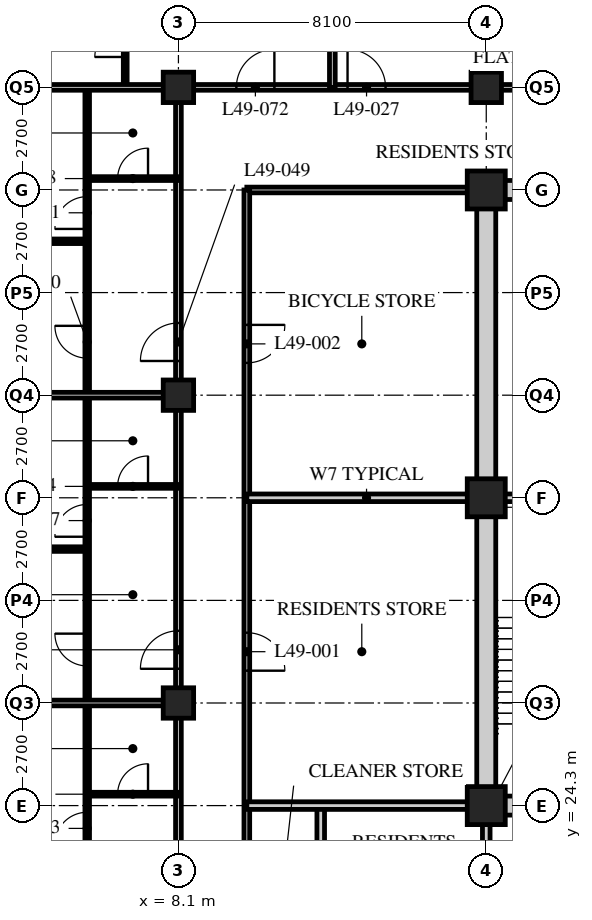
"""IFC4 building model, lengths in metres.
Left out: names, types, materials, properties, quantities, classifications, styles, units other than length and angle.
Written with IfcOpenShell. Run it as: python <this file> out.ifc"""

import sys

from ifc_helpers import new_model, si_unit, direction, frame, frame_2d, origin, origin_2d, place, context, subcontext, project, spatial, rectangle, hollow_rectangle, extrude, element, fill, save


model = new_model("IFC4")
c1 = context("Model", 3, precision=1e-05, world=origin(), true_north=direction((0.0, 1.0)))
c2 = subcontext(c1, "Body", "Model", "MODEL_VIEW")
j1 = project(units=[si_unit("LENGTHUNIT", "METRE"), si_unit("PLANEANGLEUNIT", "RADIAN")], contexts=[c1])
p1 = place(None, origin())
s1 = spatial("IfcSite", under=j1, at=p1, CompositionType="ELEMENT")
p2 = place(p1, origin())
s2 = spatial("IfcBuilding", under=s1, at=p2, CompositionType="ELEMENT")
p3 = place(p2, frame((0.0, 0.0, 192.0)))
s3 = spatial("IfcBuildingStorey", under=s2, at=p3, CompositionType="ELEMENT", Elevation=192.0)
for number, where, z_axis, x_axis in (
    (1, (8.1, 27.0, 0.0), (0.0, 0.0, 1.0), (1.0, 0.0, 0.0)),
    (2, (8.1, 35.1, 0.0), (0.0, 0.0, 1.0), (1.0, 0.0, 0.0)),
    (3, (8.1, 43.2, 0.0), (0.0, 0.0, 1.0), (1.0, 0.0, 0.0)),
):
    element("IfcColumn", number, at=place(p3, frame(where, z_axis=z_axis, x_axis=x_axis)), inside=s3, PredefinedType="COLUMN", context=c2, shape_type="SweptSolid", body=[
        extrude(hollow_rectangle(XDim=0.8, YDim=0.8, WallThickness=0.08, at=origin_2d()), origin(), (0.0, 0.0, 1.0), 3.6),
    ])
for number, where, z_axis, x_axis in (
    (4, (16.2, 24.3, 0.0), (0.0, 0.0, 1.0), (1.0, 0.0, 0.0)),
    (5, (16.2, 32.4, 0.0), (0.0, 0.0, 1.0), (1.0, 0.0, 0.0)),
    (6, (16.2, 40.5, 0.0), (0.0, 0.0, 1.0), (1.0, 0.0, 0.0)),
):
    element("IfcColumn", number, at=place(p3, frame(where, z_axis=z_axis, x_axis=x_axis)), inside=s3, PredefinedType="COLUMN", context=c2, shape_type="SweptSolid", body=[
        extrude(hollow_rectangle(XDim=1.0, YDim=1.0, WallThickness=0.1, at=origin_2d()), origin(), (0.0, 0.0, 1.0), 3.6),
    ])
p4 = place(p3, frame((16.2, 43.2, 0.0), z_axis=(0.0, 0.0, 1.0), x_axis=(1.0, 0.0, 0.0)))
e7 = element("IfcColumn", 7, at=p4, inside=s3, PredefinedType="COLUMN", context=c2, shape_type="SweptSolid", body=[
    extrude(hollow_rectangle(XDim=0.8, YDim=0.8, WallThickness=0.08, at=origin_2d()), origin(), (0.0, 0.0, 1.0), 3.6),
])
p5 = place(p3, frame((8.1, 43.2, 0.0), z_axis=(0.0, 0.0, 1.0), x_axis=(1.0, 0.0, 0.0)))
e8 = element("IfcWall", 8, at=p5, inside=s3, PredefinedType="PARTITIONING", context=c2, shape_type="SweptSolid", body=[
    extrude(rectangle(XDim=40.5, YDim=0.15, at=frame_2d((20.25, 0.0))), origin(), (0.0, 0.0, 1.0), 2.778),
])
p6 = place(p5, frame((4.45, 0.0, 0.0)))
e9 = element("IfcOpeningElement", 9, at=p6, cuts=e8, PredefinedType="OPENING", context=c2, shape_type="SweptSolid", body=[
    extrude(rectangle(XDim=1.0, YDim=2.1, at=frame_2d((0.5, 1.05))), frame((0.0, 0.085, 0.0), z_axis=(0.0, -1.0, 0.0), x_axis=(1.0, 0.0, 0.0)), (0.0, 0.0, 1.0), 0.17),
])
p7 = place(p5, frame((20.65, 0.0, 0.0)))
e10 = element("IfcOpeningElement", 10, at=p7, cuts=e8, PredefinedType="OPENING", context=c2, shape_type="SweptSolid", body=[
    extrude(rectangle(XDim=1.0, YDim=2.1, at=frame_2d((0.5, 1.05))), frame((0.0, 0.085, 0.0), z_axis=(0.0, -1.0, 0.0), x_axis=(1.0, 0.0, 0.0)), (0.0, 0.0, 1.0), 0.17),
])
p8 = place(p5, frame((28.75, 0.0, 0.0)))
e11 = element("IfcOpeningElement", 11, at=p8, cuts=e8, PredefinedType="OPENING", context=c2, shape_type="SweptSolid", body=[
    extrude(rectangle(XDim=1.0, YDim=2.1, at=frame_2d((0.5, 1.05))), frame((0.0, 0.085, 0.0), z_axis=(0.0, -1.0, 0.0), x_axis=(1.0, 0.0, 0.0)), (0.0, 0.0, 1.0), 0.17),
])
p9 = place(p5, frame((37.975, 0.0, 0.0)))
e12 = element("IfcOpeningElement", 12, at=p9, cuts=e8, PredefinedType="OPENING", context=c2, shape_type="SweptSolid", body=[
    extrude(rectangle(XDim=1.0, YDim=2.1, at=frame_2d((0.5, 1.05))), frame((0.0, 0.085, 0.0), z_axis=(0.0, -1.0, 0.0), x_axis=(1.0, 0.0, 0.0)), (0.0, 0.0, 1.0), 0.17),
])
p10 = place(p5, frame((1.525, 0.0, 0.0)))
e13 = element("IfcOpeningElement", 13, at=p10, cuts=e8, PredefinedType="OPENING", context=c2, shape_type="SweptSolid", body=[
    extrude(rectangle(XDim=1.0, YDim=2.1, at=frame_2d((0.5, 1.05))), frame((0.0, 0.085, 0.0), z_axis=(0.0, -1.0, 0.0), x_axis=(1.0, 0.0, 0.0)), (0.0, 0.0, 1.0), 0.17),
])
p11 = place(p3, frame((8.1, 18.9, 0.0), z_axis=(0.0, 0.0, 1.0), x_axis=(0.0, 1.0, 0.0)))
e14 = element("IfcWall", 14, at=p11, inside=s3, PredefinedType="PARTITIONING", context=c2, shape_type="SweptSolid", body=[
    extrude(rectangle(XDim=24.3, YDim=0.15, at=frame_2d((12.15, 0.0))), origin(), (0.0, 0.0, 1.0), 2.778),
])
p12 = place(p11, frame((0.9, 0.0, 0.0)))
e15 = element("IfcOpeningElement", 15, at=p12, cuts=e14, PredefinedType="OPENING", context=c2, shape_type="SweptSolid", body=[
    extrude(rectangle(XDim=1.0, YDim=2.1, at=frame_2d((0.5, 1.05))), frame((0.0, 0.085, 0.0), z_axis=(0.0, -1.0, 0.0), x_axis=(1.0, 0.0, 0.0)), (0.0, 0.0, 1.0), 0.17),
])
p13 = place(p11, frame((9.0, 0.0, 0.0)))
e16 = element("IfcOpeningElement", 16, at=p13, cuts=e14, PredefinedType="OPENING", context=c2, shape_type="SweptSolid", body=[
    extrude(rectangle(XDim=1.0, YDim=2.1, at=frame_2d((0.5, 1.05))), frame((0.0, 0.085, 0.0), z_axis=(0.0, -1.0, 0.0), x_axis=(1.0, 0.0, 0.0)), (0.0, 0.0, 1.0), 0.17),
])
p14 = place(p11, frame((17.1, 0.0, 0.0)))
e17 = element("IfcOpeningElement", 17, at=p14, cuts=e14, PredefinedType="OPENING", context=c2, shape_type="SweptSolid", body=[
    extrude(rectangle(XDim=1.0, YDim=2.1, at=frame_2d((0.5, 1.05))), frame((0.0, 0.085, 0.0), z_axis=(0.0, -1.0, 0.0), x_axis=(1.0, 0.0, 0.0)), (0.0, 0.0, 1.0), 0.17),
])
p15 = place(p3, frame((16.0, 40.5, 0.0), z_axis=(0.0, 0.0, 1.0), x_axis=(-1.0, 0.0, 0.0)))
e18 = element("IfcWall", 18, at=p15, inside=s3, PredefinedType="PARTITIONING", context=c2, shape_type="SweptSolid", body=[
    extrude(rectangle(XDim=6.1, YDim=0.15, at=frame_2d((3.05, 0.0))), origin(), (0.0, 0.0, 1.0), 3.39),
])
p16 = place(p3, frame((9.9, 40.5, 0.0), z_axis=(0.0, 0.0, 1.0), x_axis=(0.0, -1.0, 0.0)))
e19 = element("IfcWall", 19, at=p16, inside=s3, PredefinedType="PARTITIONING", context=c2, shape_type="SweptSolid", body=[
    extrude(rectangle(XDim=19.8, YDim=0.15, at=frame_2d((9.9, 0.0))), origin(), (0.0, 0.0, 1.0), 3.39),
])
p17 = place(p16, frame((11.65, 0.0, 0.0)))
e20 = element("IfcOpeningElement", 20, at=p17, cuts=e19, PredefinedType="OPENING", context=c2, shape_type="SweptSolid", body=[
    extrude(rectangle(XDim=1.0, YDim=2.1, at=frame_2d((0.5, 1.05))), frame((0.0, 0.085, 0.0), z_axis=(0.0, -1.0, 0.0), x_axis=(1.0, 0.0, 0.0)), (0.0, 0.0, 1.0), 0.17),
])
p18 = place(p16, frame((3.55, 0.0, 0.0)))
e21 = element("IfcOpeningElement", 21, at=p18, cuts=e19, PredefinedType="OPENING", context=c2, shape_type="SweptSolid", body=[
    extrude(rectangle(XDim=1.0, YDim=2.1, at=frame_2d((0.5, 1.05))), frame((0.0, 0.085, 0.0), z_axis=(0.0, -1.0, 0.0), x_axis=(1.0, 0.0, 0.0)), (0.0, 0.0, 1.0), 0.17),
])
p19 = place(p3, frame((9.9, 32.4, 0.0), z_axis=(0.0, 0.0, 1.0), x_axis=(1.0, 0.0, 0.0)))
e22 = element("IfcWall", 22, at=p19, inside=s3, PredefinedType="SOLIDWALL", context=c2, shape_type="SweptSolid", body=[
    extrude(rectangle(XDim=6.3, YDim=0.2, at=frame_2d((3.15, 0.0))), origin(), (0.0, 0.0, 1.0), 3.39),
])
p20 = place(p3, frame((16.2, 20.7, 0.0), z_axis=(0.0, 0.0, 1.0), x_axis=(0.0, 1.0, 0.0)))
e23 = element("IfcWall", 23, at=p20, inside=s3, PredefinedType="SOLIDWALL", context=c2, shape_type="SweptSolid", body=[
    extrude(rectangle(XDim=3.6, YDim=0.2, at=frame_2d((1.8, 0.0))), origin(), (0.0, 0.0, 1.0), 2.778),
])
p21 = place(p3, frame((11.844, 20.7, 0.0), z_axis=(0.0, 0.0, 1.0), x_axis=(0.0, 1.0, 0.0)))
e24 = element("IfcWall", 24, at=p21, inside=s3, PredefinedType="SOLIDWALL", context=c2, shape_type="SweptSolid", body=[
    extrude(rectangle(XDim=3.6, YDim=0.2, at=frame_2d((1.8, 0.0))), origin(), (0.0, 0.0, 1.0), 3.39),
])
p22 = place(p3, frame((9.9, 24.3, 0.0), z_axis=(0.0, 0.0, 1.0), x_axis=(1.0, 0.0, 0.0)))
e25 = element("IfcWall", 25, at=p22, inside=s3, PredefinedType="SOLIDWALL", context=c2, shape_type="SweptSolid", body=[
    extrude(rectangle(XDim=6.3, YDim=0.2, at=frame_2d((3.15, 0.0))), origin(), (0.0, 0.0, 1.0), 3.39),
])
p23 = place(p3, frame((5.7, 18.9, 0.0), z_axis=(0.0, 0.0, 1.0), x_axis=(0.0, 1.0, 0.0)))
e26 = element("IfcWall", 26, at=p23, inside=s3, PredefinedType="PARTITIONING", context=c2, shape_type="SweptSolid", body=[
    extrude(rectangle(XDim=24.3, YDim=0.12, at=frame_2d((12.15, 0.0))), origin(), (0.0, 0.0, 1.0), 3.39),
])
p24 = place(p23, frame((0.975, 0.0, 0.0)))
e27 = element("IfcOpeningElement", 27, at=p24, cuts=e26, PredefinedType="OPENING", context=c2, shape_type="SweptSolid", body=[
    extrude(rectangle(XDim=0.85, YDim=2.1, at=frame_2d((0.425, 1.05))), frame((0.0, 0.07, 0.0), z_axis=(0.0, -1.0, 0.0), x_axis=(1.0, 0.0, 0.0)), (0.0, 0.0, 1.0), 0.14),
])
p25 = place(p23, frame((4.375, 0.0, 0.0)))
e28 = element("IfcOpeningElement", 28, at=p25, cuts=e26, PredefinedType="OPENING", context=c2, shape_type="SweptSolid", body=[
    extrude(rectangle(XDim=0.85, YDim=2.1, at=frame_2d((0.425, 1.05))), frame((0.0, 0.07, 0.0), z_axis=(0.0, -1.0, 0.0), x_axis=(1.0, 0.0, 0.0)), (0.0, 0.0, 1.0), 0.14),
])
p26 = place(p23, frame((9.075, 0.0, 0.0)))
e29 = element("IfcOpeningElement", 29, at=p26, cuts=e26, PredefinedType="OPENING", context=c2, shape_type="SweptSolid", body=[
    extrude(rectangle(XDim=0.85, YDim=2.1, at=frame_2d((0.425, 1.05))), frame((0.0, 0.07, 0.0), z_axis=(0.0, -1.0, 0.0), x_axis=(1.0, 0.0, 0.0)), (0.0, 0.0, 1.0), 0.14),
])
p27 = place(p23, frame((12.475, 0.0, 0.0)))
e30 = element("IfcOpeningElement", 30, at=p27, cuts=e26, PredefinedType="OPENING", context=c2, shape_type="SweptSolid", body=[
    extrude(rectangle(XDim=0.85, YDim=2.1, at=frame_2d((0.425, 1.05))), frame((0.0, 0.07, 0.0), z_axis=(0.0, -1.0, 0.0), x_axis=(1.0, 0.0, 0.0)), (0.0, 0.0, 1.0), 0.14),
])
p28 = place(p23, frame((17.175, 0.0, 0.0)))
e31 = element("IfcOpeningElement", 31, at=p28, cuts=e26, PredefinedType="OPENING", context=c2, shape_type="SweptSolid", body=[
    extrude(rectangle(XDim=0.85, YDim=2.1, at=frame_2d((0.425, 1.05))), frame((0.0, 0.07, 0.0), z_axis=(0.0, -1.0, 0.0), x_axis=(1.0, 0.0, 0.0)), (0.0, 0.0, 1.0), 0.14),
])
p29 = place(p23, frame((20.575, 0.0, 0.0)))
e32 = element("IfcOpeningElement", 32, at=p29, cuts=e26, PredefinedType="OPENING", context=c2, shape_type="SweptSolid", body=[
    extrude(rectangle(XDim=0.85, YDim=2.1, at=frame_2d((0.425, 1.05))), frame((0.0, 0.07, 0.0), z_axis=(0.0, -1.0, 0.0), x_axis=(1.0, 0.0, 0.0)), (0.0, 0.0, 1.0), 0.14),
])
p30 = place(p3, frame((8.1, 24.6, 0.0), z_axis=(0.0, 0.0, 1.0), x_axis=(-1.0, 0.0, 0.0)))
e33 = element("IfcWall", 33, at=p30, inside=s3, PredefinedType="PARTITIONING", context=c2, shape_type="SweptSolid", body=[
    extrude(rectangle(XDim=2.4, YDim=0.1, at=frame_2d((1.2, 0.0))), origin(), (0.0, 0.0, 1.0), 3.39),
])
p31 = place(p30, frame((0.8, 0.0, 0.0)))
e34 = element("IfcOpeningElement", 34, at=p31, cuts=e33, PredefinedType="OPENING", context=c2, shape_type="SweptSolid", body=[
    extrude(rectangle(XDim=0.8, YDim=2.1, at=frame_2d((0.4, 1.05))), frame((0.0, 0.06, 0.0), z_axis=(0.0, -1.0, 0.0), x_axis=(1.0, 0.0, 0.0)), (0.0, 0.0, 1.0), 0.12),
])
p32 = place(p3, frame((8.1, 27.0, 0.0), z_axis=(0.0, 0.0, 1.0), x_axis=(-1.0, 0.0, 0.0)))
e35 = element("IfcWall", 35, at=p32, inside=s3, PredefinedType="PARTITIONING", context=c2, shape_type="SweptSolid", body=[
    extrude(rectangle(XDim=7.8, YDim=0.15, at=frame_2d((3.9, 0.0))), origin(), (0.0, 0.0, 1.0), 2.778),
])
p33 = place(p3, frame((8.1, 32.7, 0.0), z_axis=(0.0, 0.0, 1.0), x_axis=(-1.0, 0.0, 0.0)))
e36 = element("IfcWall", 36, at=p33, inside=s3, PredefinedType="PARTITIONING", context=c2, shape_type="SweptSolid", body=[
    extrude(rectangle(XDim=2.4, YDim=0.1, at=frame_2d((1.2, 0.0))), origin(), (0.0, 0.0, 1.0), 3.39),
])
p34 = place(p33, frame((0.8, 0.0, 0.0)))
e37 = element("IfcOpeningElement", 37, at=p34, cuts=e36, PredefinedType="OPENING", context=c2, shape_type="SweptSolid", body=[
    extrude(rectangle(XDim=0.8, YDim=2.1, at=frame_2d((0.4, 1.05))), frame((0.0, 0.06, 0.0), z_axis=(0.0, -1.0, 0.0), x_axis=(1.0, 0.0, 0.0)), (0.0, 0.0, 1.0), 0.12),
])
p35 = place(p3, frame((5.7, 31.05, 0.0), z_axis=(0.0, 0.0, 1.0), x_axis=(-1.0, 0.0, 0.0)))
e38 = element("IfcWall", 38, at=p35, inside=s3, PredefinedType="PARTITIONING", context=c2, shape_type="SweptSolid", body=[
    extrude(rectangle(XDim=5.4, YDim=0.12, at=frame_2d((2.7, 0.0))), origin(), (0.0, 0.0, 1.0), 3.39),
])
p36 = place(p3, frame((8.1, 35.1, 0.0), z_axis=(0.0, 0.0, 1.0), x_axis=(-1.0, 0.0, 0.0)))
e39 = element("IfcWall", 39, at=p36, inside=s3, PredefinedType="PARTITIONING", context=c2, shape_type="SweptSolid", body=[
    extrude(rectangle(XDim=7.8, YDim=0.15, at=frame_2d((3.9, 0.0))), origin(), (0.0, 0.0, 1.0), 2.778),
])
p37 = place(p3, frame((8.1, 40.8, 0.0), z_axis=(0.0, 0.0, 1.0), x_axis=(-1.0, 0.0, 0.0)))
e40 = element("IfcWall", 40, at=p37, inside=s3, PredefinedType="PARTITIONING", context=c2, shape_type="SweptSolid", body=[
    extrude(rectangle(XDim=2.4, YDim=0.1, at=frame_2d((1.2, 0.0))), origin(), (0.0, 0.0, 1.0), 3.39),
])
p38 = place(p37, frame((0.8, 0.0, 0.0)))
e41 = element("IfcOpeningElement", 41, at=p38, cuts=e40, PredefinedType="OPENING", context=c2, shape_type="SweptSolid", body=[
    extrude(rectangle(XDim=0.8, YDim=2.1, at=frame_2d((0.4, 1.05))), frame((0.0, 0.06, 0.0), z_axis=(0.0, -1.0, 0.0), x_axis=(1.0, 0.0, 0.0)), (0.0, 0.0, 1.0), 0.12),
])
p39 = place(p3, frame((5.7, 39.15, 0.0), z_axis=(0.0, 0.0, 1.0), x_axis=(-1.0, 0.0, 0.0)))
e42 = element("IfcWall", 42, at=p39, inside=s3, PredefinedType="PARTITIONING", context=c2, shape_type="SweptSolid", body=[
    extrude(rectangle(XDim=5.4, YDim=0.12, at=frame_2d((2.7, 0.0))), origin(), (0.0, 0.0, 1.0), 3.39),
])
p40 = place(p3, frame((6.7, 43.2, 0.0), z_axis=(0.0, 0.0, 1.0), x_axis=(0.0, 1.0, 0.0)))
e43 = element("IfcWall", 43, at=p40, inside=s3, PredefinedType="PARTITIONING", context=c2, shape_type="SweptSolid", body=[
    extrude(rectangle(XDim=2.4, YDim=0.1, at=frame_2d((1.2, 0.0))), origin(), (0.0, 0.0, 1.0), 3.39),
])
p41 = place(p40, frame((0.8, 0.0, 0.0)))
e44 = element("IfcOpeningElement", 44, at=p41, cuts=e43, PredefinedType="OPENING", context=c2, shape_type="SweptSolid", body=[
    extrude(rectangle(XDim=0.8, YDim=2.1, at=frame_2d((0.4, 1.05))), frame((0.0, 0.06, 0.0), z_axis=(0.0, -1.0, 0.0), x_axis=(1.0, 0.0, 0.0)), (0.0, 0.0, 1.0), 0.12),
])
p42 = place(p3, frame((0.3, 43.2, 0.0), z_axis=(0.0, 0.0, 1.0), x_axis=(1.0, 0.0, 0.0)))
e45 = element("IfcWall", 45, at=p42, inside=s3, PredefinedType="PARTITIONING", context=c2, shape_type="SweptSolid", body=[
    extrude(rectangle(XDim=7.8, YDim=0.15, at=frame_2d((3.9, 0.0))), origin(), (0.0, 0.0, 1.0), 2.778),
])
p43 = place(p3, frame((12.15, 43.2, 0.0), z_axis=(0.0, 0.0, 1.0), x_axis=(0.0, 1.0, 0.0)))
e46 = element("IfcWall", 46, at=p43, inside=s3, PredefinedType="PARTITIONING", context=c2, shape_type="SweptSolid", body=[
    extrude(rectangle(XDim=15.9, YDim=0.15, at=frame_2d((7.95, 0.0))), origin(), (0.0, 0.0, 1.0), 3.39),
])
p44 = place(p3, frame((15.95, 24.3, 0.0), z_axis=(0.0, 0.0, 1.0), x_axis=(1.0, 0.0, 0.0)))
e47 = element("IfcWall", 47, at=p44, inside=s3, PredefinedType="SOLIDWALL", context=c2, shape_type="SweptSolid", body=[
    extrude(rectangle(XDim=24.8, YDim=0.5, at=frame_2d((12.4, 0.0))), origin(), (0.0, 0.0, 1.0), 2.74),
])
p45 = place(p44, frame((11.5, 0.0, 0.0)))
e48 = element("IfcOpeningElement", 48, at=p45, cuts=e47, PredefinedType="OPENING", context=c2, shape_type="SweptSolid", body=[
    extrude(rectangle(XDim=1.8, YDim=2.4, at=frame_2d((0.9, 1.2))), frame((0.0, 0.26, 0.0), z_axis=(0.0, -1.0, 0.0), x_axis=(1.0, 0.0, 0.0)), (0.0, 0.0, 1.0), 0.52),
])
p46 = place(p3, frame((15.95, 40.5, 0.0), z_axis=(0.0, 0.0, 1.0), x_axis=(1.0, 0.0, 0.0)))
e49 = element("IfcWall", 49, at=p46, inside=s3, PredefinedType="SOLIDWALL", context=c2, shape_type="SweptSolid", body=[
    extrude(rectangle(XDim=24.8, YDim=0.5, at=frame_2d((12.4, 0.0))), origin(), (0.0, 0.0, 1.0), 2.74),
])
p47 = place(p46, frame((11.5, 0.0, 0.0)))
e50 = element("IfcOpeningElement", 50, at=p47, cuts=e49, PredefinedType="OPENING", context=c2, shape_type="SweptSolid", body=[
    extrude(rectangle(XDim=1.8, YDim=2.4, at=frame_2d((0.9, 1.2))), frame((0.0, 0.26, 0.0), z_axis=(0.0, -1.0, 0.0), x_axis=(1.0, 0.0, 0.0)), (0.0, 0.0, 1.0), 0.52),
])
p48 = place(p3, frame((16.2, 24.55, 0.0), z_axis=(0.0, 0.0, 1.0), x_axis=(0.0, 1.0, 0.0)))
e51 = element("IfcWall", 51, at=p48, inside=s3, PredefinedType="SOLIDWALL", context=c2, shape_type="SweptSolid", body=[
    extrude(rectangle(XDim=15.7, YDim=0.5, at=frame_2d((7.85, 0.0))), origin(), (0.0, 0.0, 1.0), 2.778),
])
p49 = place(p3, frame((16.45, 32.4, 0.0), z_axis=(0.0, 0.0, 1.0), x_axis=(1.0, 0.0, 0.0)))
e52 = element("IfcWall", 52, at=p49, inside=s3, PredefinedType="SOLIDWALL", context=c2, shape_type="SweptSolid", body=[
    extrude(rectangle(XDim=7.95, YDim=0.2, at=frame_2d((3.975, 0.0))), origin(), (0.0, 0.0, 1.0), 2.778),
])
p50 = place(p17, origin())
e53 = element("IfcDoor", 53, at=p50, inside=s3, OperationType="SINGLE_SWING_RIGHT", PredefinedType="DOOR", context=c2, shape_type="SweptSolid", body=[
    extrude(rectangle(XDim=1.0, YDim=2.1, at=frame_2d((0.5, 1.05))), frame((0.0, 0.025, 0.0), z_axis=(0.0, -1.0, 0.0), x_axis=(1.0, 0.0, 0.0)), (0.0, 0.0, 1.0), 0.05),
])
fill(e20, e53)
p51 = place(p18, origin())
e54 = element("IfcDoor", 54, at=p51, inside=s3, OperationType="SINGLE_SWING_LEFT", PredefinedType="DOOR", context=c2, shape_type="SweptSolid", body=[
    extrude(rectangle(XDim=1.0, YDim=2.1, at=frame_2d((0.5, 1.05))), frame((0.0, 0.025, 0.0), z_axis=(0.0, -1.0, 0.0), x_axis=(1.0, 0.0, 0.0)), (0.0, 0.0, 1.0), 0.05),
])
fill(e21, e54)
p52 = place(p6, origin())
e55 = element("IfcDoor", 55, at=p52, inside=s3, OperationType="SINGLE_SWING_LEFT", PredefinedType="DOOR", context=c2, shape_type="SweptSolid", body=[
    extrude(rectangle(XDim=1.0, YDim=2.1, at=frame_2d((0.5, 1.05))), frame((0.0, 0.025, 0.0), z_axis=(0.0, -1.0, 0.0), x_axis=(1.0, 0.0, 0.0)), (0.0, 0.0, 1.0), 0.05),
])
fill(e9, e55)
p53 = place(p31, origin())
e56 = element("IfcDoor", 56, at=p53, inside=s3, OperationType="SINGLE_SWING_RIGHT", PredefinedType="DOOR", context=c2, shape_type="SweptSolid", body=[
    extrude(rectangle(XDim=0.8, YDim=2.1, at=frame_2d((0.4, 1.05))), frame((0.0, 0.025, 0.0), z_axis=(0.0, -1.0, 0.0), x_axis=(1.0, 0.0, 0.0)), (0.0, 0.0, 1.0), 0.05),
])
fill(e34, e56)
p54 = place(p25, origin())
e57 = element("IfcDoor", 57, at=p54, inside=s3, OperationType="SINGLE_SWING_LEFT", PredefinedType="DOOR", context=c2, shape_type="SweptSolid", body=[
    extrude(rectangle(XDim=0.85, YDim=2.1, at=frame_2d((0.425, 1.05))), frame((0.0, 0.025, 0.0), z_axis=(0.0, -1.0, 0.0), x_axis=(1.0, 0.0, 0.0)), (0.0, 0.0, 1.0), 0.05),
])
fill(e28, e57)
p55 = place(p34, origin())
e58 = element("IfcDoor", 58, at=p55, inside=s3, OperationType="SINGLE_SWING_RIGHT", PredefinedType="DOOR", context=c2, shape_type="SweptSolid", body=[
    extrude(rectangle(XDim=0.8, YDim=2.1, at=frame_2d((0.4, 1.05))), frame((0.0, 0.025, 0.0), z_axis=(0.0, -1.0, 0.0), x_axis=(1.0, 0.0, 0.0)), (0.0, 0.0, 1.0), 0.05),
])
fill(e37, e58)
p56 = place(p13, origin())
e59 = element("IfcDoor", 59, at=p56, inside=s3, OperationType="SINGLE_SWING_LEFT", PredefinedType="DOOR", context=c2, shape_type="SweptSolid", body=[
    extrude(rectangle(XDim=1.0, YDim=2.1, at=frame_2d((0.5, 1.05))), frame((0.0, 0.025, 0.0), z_axis=(0.0, -1.0, 0.0), x_axis=(1.0, 0.0, 0.0)), (0.0, 0.0, 1.0), 0.05),
])
fill(e16, e59)
p57 = place(p26, origin())
e60 = element("IfcDoor", 60, at=p57, inside=s3, OperationType="SINGLE_SWING_RIGHT", PredefinedType="DOOR", context=c2, shape_type="SweptSolid", body=[
    extrude(rectangle(XDim=0.85, YDim=2.1, at=frame_2d((0.425, 1.05))), frame((0.0, 0.025, 0.0), z_axis=(0.0, -1.0, 0.0), x_axis=(1.0, 0.0, 0.0)), (0.0, 0.0, 1.0), 0.05),
])
fill(e29, e60)
p58 = place(p27, origin())
e61 = element("IfcDoor", 61, at=p58, inside=s3, OperationType="SINGLE_SWING_LEFT", PredefinedType="DOOR", context=c2, shape_type="SweptSolid", body=[
    extrude(rectangle(XDim=0.85, YDim=2.1, at=frame_2d((0.425, 1.05))), frame((0.0, 0.025, 0.0), z_axis=(0.0, -1.0, 0.0), x_axis=(1.0, 0.0, 0.0)), (0.0, 0.0, 1.0), 0.05),
])
fill(e30, e61)
p59 = place(p38, origin())
e62 = element("IfcDoor", 62, at=p59, inside=s3, OperationType="SINGLE_SWING_RIGHT", PredefinedType="DOOR", context=c2, shape_type="SweptSolid", body=[
    extrude(rectangle(XDim=0.8, YDim=2.1, at=frame_2d((0.4, 1.05))), frame((0.0, 0.025, 0.0), z_axis=(0.0, -1.0, 0.0), x_axis=(1.0, 0.0, 0.0)), (0.0, 0.0, 1.0), 0.05),
])
fill(e41, e62)
p60 = place(p14, origin())
e63 = element("IfcDoor", 63, at=p60, inside=s3, OperationType="SINGLE_SWING_LEFT", PredefinedType="DOOR", context=c2, shape_type="SweptSolid", body=[
    extrude(rectangle(XDim=1.0, YDim=2.1, at=frame_2d((0.5, 1.05))), frame((0.0, 0.025, 0.0), z_axis=(0.0, -1.0, 0.0), x_axis=(1.0, 0.0, 0.0)), (0.0, 0.0, 1.0), 0.05),
])
fill(e17, e63)
p61 = place(p28, origin())
e64 = element("IfcDoor", 64, at=p61, inside=s3, OperationType="SINGLE_SWING_RIGHT", PredefinedType="DOOR", context=c2, shape_type="SweptSolid", body=[
    extrude(rectangle(XDim=0.85, YDim=2.1, at=frame_2d((0.425, 1.05))), frame((0.0, 0.025, 0.0), z_axis=(0.0, -1.0, 0.0), x_axis=(1.0, 0.0, 0.0)), (0.0, 0.0, 1.0), 0.05),
])
fill(e31, e64)
p62 = place(p29, origin())
e65 = element("IfcDoor", 65, at=p62, inside=s3, OperationType="SINGLE_SWING_LEFT", PredefinedType="DOOR", context=c2, shape_type="SweptSolid", body=[
    extrude(rectangle(XDim=0.85, YDim=2.1, at=frame_2d((0.425, 1.05))), frame((0.0, 0.025, 0.0), z_axis=(0.0, -1.0, 0.0), x_axis=(1.0, 0.0, 0.0)), (0.0, 0.0, 1.0), 0.05),
])
fill(e32, e65)
p63 = place(p10, origin())
e66 = element("IfcDoor", 66, at=p63, inside=s3, OperationType="SINGLE_SWING_RIGHT", PredefinedType="DOOR", context=c2, shape_type="SweptSolid", body=[
    extrude(rectangle(XDim=1.0, YDim=2.1, at=frame_2d((0.5, 1.05))), frame((0.0, 0.025, 0.0), z_axis=(0.0, -1.0, 0.0), x_axis=(1.0, 0.0, 0.0)), (0.0, 0.0, 1.0), 0.05),
])
fill(e13, e66)
p64 = place(p41, origin())
e67 = element("IfcDoor", 67, at=p64, inside=s3, OperationType="SINGLE_SWING_LEFT", PredefinedType="DOOR", context=c2, shape_type="SweptSolid", body=[
    extrude(rectangle(XDim=0.8, YDim=2.1, at=frame_2d((0.4, 1.05))), frame((0.0, 0.025, 0.0), z_axis=(0.0, -1.0, 0.0), x_axis=(1.0, 0.0, 0.0)), (0.0, 0.0, 1.0), 0.05),
])
fill(e44, e67)
save(model, sys.argv[1])
